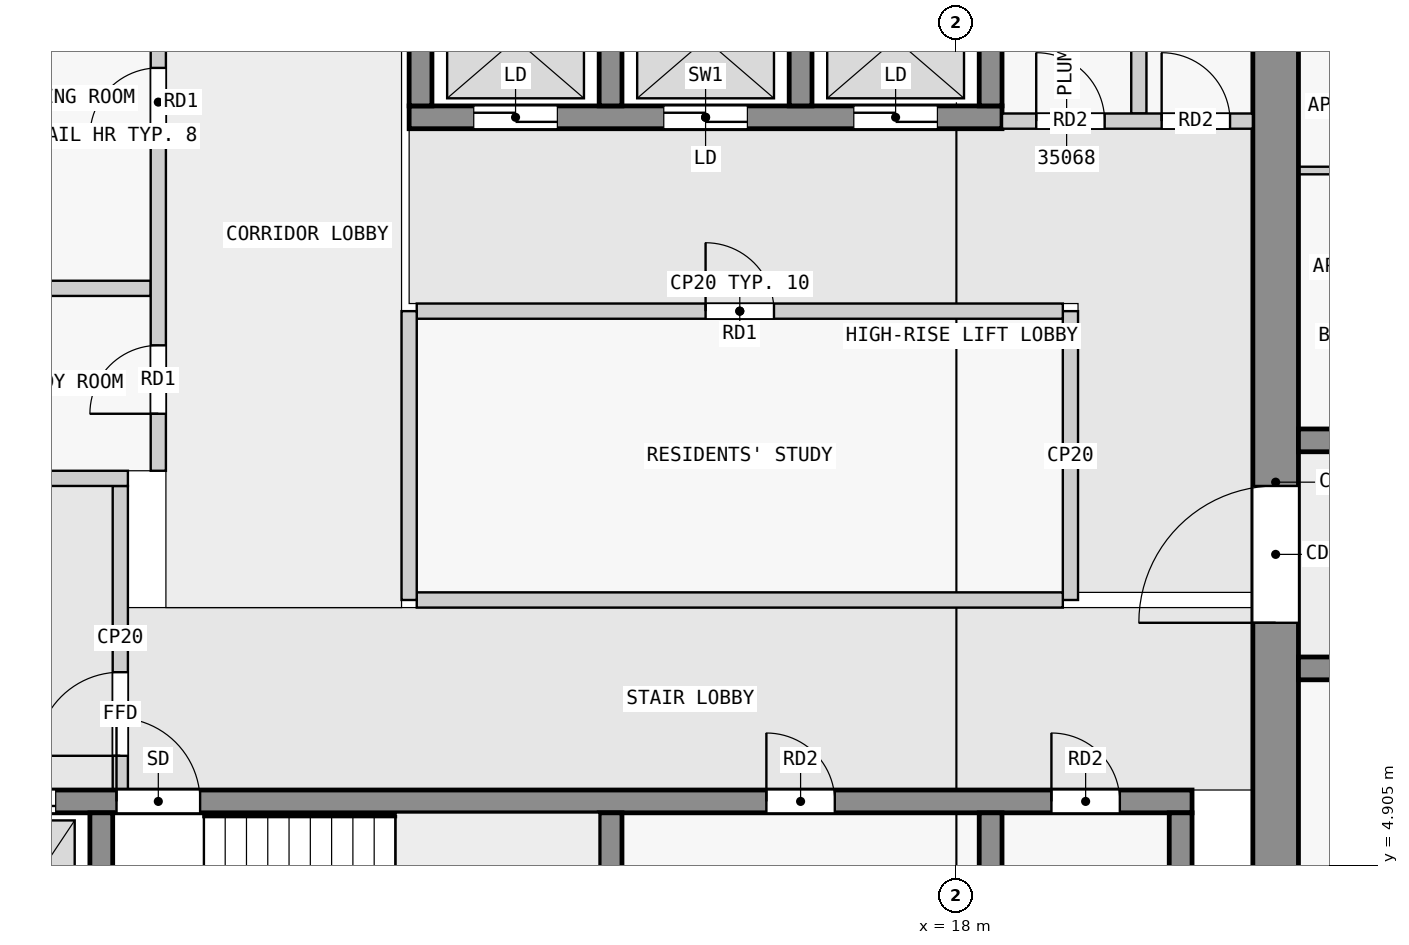
"""IFC4 building model, lengths in metres.
Left out: names, types, materials, properties, quantities, classifications, styles, units other than length and angle.
Written with IfcOpenShell. Run it as: python <this file> out.ifc"""

import sys

from ifc_helpers import new_model, si_unit, direction, frame, frame_2d, origin, place, context, subcontext, project, spatial, rectangle, extrude, element, fill, save


model = new_model("IFC4")
c1 = context("Model", 3, precision=1e-05, world=origin(), true_north=direction((0.0, 1.0)))
c2 = subcontext(c1, "Body", "Model", "MODEL_VIEW")
j1 = project(units=[si_unit("LENGTHUNIT", "METRE"), si_unit("PLANEANGLEUNIT", "RADIAN")], contexts=[c1])
p1 = place(None, origin())
s1 = spatial("IfcSite", under=j1, at=p1, CompositionType="ELEMENT")
p2 = place(p1, origin())
s2 = spatial("IfcBuilding", under=s1, at=p2, CompositionType="ELEMENT")
p3 = place(p2, frame((0.0, 0.0, 139.4)))
s3 = spatial("IfcBuildingStorey", under=s2, at=p3, CompositionType="ELEMENT", Elevation=139.4)
p4 = place(p3, frame((22.2, 2.5, 0.0), z_axis=(0.0, 0.0, 1.0), x_axis=(0.0, 1.0, 0.0)))
e1 = element("IfcWall", 1, at=p4, inside=s3, PredefinedType="SHEAR", context=c2, shape_type="SweptSolid", body=[
    extrude(rectangle(XDim=14.9, YDim=0.6, at=frame_2d((7.45, 0.0))), origin(), (0.0, 0.0, 1.0), 3.25),
])
p5 = place(p4, frame((5.6, 0.0, 0.0)))
e2 = element("IfcOpeningElement", 2, at=p5, cuts=e1, PredefinedType="OPENING", context=c2, shape_type="SweptSolid", body=[
    extrude(rectangle(XDim=1.8, YDim=2.1, at=frame_2d((0.9, 1.05))), frame((0.0, 0.31, 0.0), z_axis=(0.0, -1.0, 0.0), x_axis=(1.0, 0.0, 0.0)), (0.0, 0.0, 1.0), 0.62),
])
for number, where, z_axis, x_axis in (
    (3, (6.75, 2.8, 0.0), (0.0, 0.0, 1.0), (0.0, 1.0, 0.0)),
    (4, (13.45, 2.8, 0.0), (0.0, 0.0, 1.0), (0.0, 1.0, 0.0)),
    (5, (18.45, 2.8, 0.0), (0.0, 0.0, 1.0), (0.0, 1.0, 0.0)),
    (6, (20.95, 2.8, 0.0), (0.0, 0.0, 1.0), (0.0, 1.0, 0.0)),
):
    element("IfcWall", number, at=place(p3, frame(where, z_axis=z_axis, x_axis=x_axis)), inside=s3, PredefinedType="SHEAR", context=c2, shape_type="SweptSolid", body=[
        extrude(rectangle(XDim=2.8, YDim=0.3, at=frame_2d((1.4, 0.0))), origin(), (0.0, 0.0, 1.0), 3.25),
    ])
p6 = place(p3, frame((2.3, 5.75, 0.0), z_axis=(0.0, 0.0, 1.0), x_axis=(1.0, 0.0, 0.0)))
e7 = element("IfcWall", 7, at=p6, inside=s3, PredefinedType="SHEAR", context=c2, shape_type="SweptSolid", body=[
    extrude(rectangle(XDim=18.8, YDim=0.3, at=frame_2d((9.4, 0.0))), origin(), (0.0, 0.0, 1.0), 3.25),
])
p7 = place(p6, frame((4.65, 0.0, 0.0)))
e8 = element("IfcOpeningElement", 8, at=p7, cuts=e7, PredefinedType="OPENING", context=c2, shape_type="SweptSolid", body=[
    extrude(rectangle(XDim=1.1, YDim=2.1, at=frame_2d((0.55, 1.05))), frame((0.0, 0.16, 0.0), z_axis=(0.0, -1.0, 0.0), x_axis=(1.0, 0.0, 0.0)), (0.0, 0.0, 1.0), 0.32),
])
p8 = place(p6, frame((0.45, 0.0, 0.0)))
e9 = element("IfcOpeningElement", 9, at=p8, cuts=e7, PredefinedType="OPENING", context=c2, shape_type="SweptSolid", body=[
    extrude(rectangle(XDim=1.1, YDim=2.1, at=frame_2d((0.55, 1.05))), frame((0.0, 0.16, 0.0), z_axis=(0.0, -1.0, 0.0), x_axis=(1.0, 0.0, 0.0)), (0.0, 0.0, 1.0), 0.32),
])
p9 = place(p6, frame((2.75, 0.0, 0.0)))
e10 = element("IfcOpeningElement", 10, at=p9, cuts=e7, PredefinedType="OPENING", context=c2, shape_type="SweptSolid", body=[
    extrude(rectangle(XDim=1.1, YDim=2.1, at=frame_2d((0.55, 1.05))), frame((0.0, 0.16, 0.0), z_axis=(0.0, -1.0, 0.0), x_axis=(1.0, 0.0, 0.0)), (0.0, 0.0, 1.0), 0.32),
])
p10 = place(p6, frame((13.2, 0.0, 0.0)))
e11 = element("IfcOpeningElement", 11, at=p10, cuts=e7, PredefinedType="OPENING", context=c2, shape_type="SweptSolid", body=[
    extrude(rectangle(XDim=0.9, YDim=2.1, at=frame_2d((0.45, 1.05))), frame((0.0, 0.16, 0.0), z_axis=(0.0, -1.0, 0.0), x_axis=(1.0, 0.0, 0.0)), (0.0, 0.0, 1.0), 0.32),
])
p11 = place(p6, frame((16.95, 0.0, 0.0)))
e12 = element("IfcOpeningElement", 12, at=p11, cuts=e7, PredefinedType="OPENING", context=c2, shape_type="SweptSolid", body=[
    extrude(rectangle(XDim=0.9, YDim=2.1, at=frame_2d((0.45, 1.05))), frame((0.0, 0.16, 0.0), z_axis=(0.0, -1.0, 0.0), x_axis=(1.0, 0.0, 0.0)), (0.0, 0.0, 1.0), 0.32),
])
p12 = place(p3, frame((10.8, 14.75, 0.0), z_axis=(0.0, 0.0, 1.0), x_axis=(1.0, 0.0, 0.0)))
e13 = element("IfcWall", 13, at=p12, inside=s3, PredefinedType="SHEAR", context=c2, shape_type="SweptSolid", body=[
    extrude(rectangle(XDim=7.8, YDim=0.3, at=frame_2d((3.9, 0.0))), origin(), (0.0, 0.0, 1.0), 3.25),
])
p13 = place(p12, frame((0.85, 0.0, 0.0)))
e14 = element("IfcOpeningElement", 14, at=p13, cuts=e13, PredefinedType="OPENING", context=c2, shape_type="SweptSolid", body=[
    extrude(rectangle(XDim=1.1, YDim=2.1, at=frame_2d((0.55, 1.05))), frame((0.0, 0.16, 0.0), z_axis=(0.0, -1.0, 0.0), x_axis=(1.0, 0.0, 0.0)), (0.0, 0.0, 1.0), 0.32),
])
p14 = place(p12, frame((3.35, 0.0, 0.0)))
e15 = element("IfcOpeningElement", 15, at=p14, cuts=e13, PredefinedType="OPENING", context=c2, shape_type="SweptSolid", body=[
    extrude(rectangle(XDim=1.1, YDim=2.1, at=frame_2d((0.55, 1.05))), frame((0.0, 0.16, 0.0), z_axis=(0.0, -1.0, 0.0), x_axis=(1.0, 0.0, 0.0)), (0.0, 0.0, 1.0), 0.32),
])
p15 = place(p12, frame((5.85, 0.0, 0.0)))
e16 = element("IfcOpeningElement", 16, at=p15, cuts=e13, PredefinedType="OPENING", context=c2, shape_type="SweptSolid", body=[
    extrude(rectangle(XDim=1.1, YDim=2.1, at=frame_2d((0.55, 1.05))), frame((0.0, 0.16, 0.0), z_axis=(0.0, -1.0, 0.0), x_axis=(1.0, 0.0, 0.0)), (0.0, 0.0, 1.0), 0.32),
])
for number, where, z_axis, x_axis in (
    (17, (10.95, 14.9, 0.0), (0.0, 0.0, 1.0), (0.0, 1.0, 0.0)),
    (18, (13.45, 14.9, 0.0), (0.0, 0.0, 1.0), (0.0, 1.0, 0.0)),
    (19, (15.95, 14.9, 0.0), (0.0, 0.0, 1.0), (0.0, 1.0, 0.0)),
    (20, (18.45, 14.9, 0.0), (0.0, 0.0, 1.0), (0.0, 1.0, 0.0)),
):
    element("IfcWall", number, at=place(p3, frame(where, z_axis=z_axis, x_axis=x_axis)), inside=s3, PredefinedType="SHEAR", context=c2, shape_type="SweptSolid", body=[
        extrude(rectangle(XDim=2.0, YDim=0.3, at=frame_2d((1.0, 0.0))), origin(), (0.0, 0.0, 1.0), 3.25),
    ])
p16 = place(p3, frame((22.5, 7.5, 0.0), z_axis=(0.0, 0.0, 1.0), x_axis=(1.0, 0.0, 0.0)))
e21 = element("IfcWall", 21, at=p16, inside=s3, PredefinedType="SHEAR", context=c2, shape_type="SweptSolid", body=[
    extrude(rectangle(XDim=22.5, YDim=0.3, at=frame_2d((11.25, 0.0))), origin(), (0.0, 0.0, 1.0), 3.25),
])
p17 = place(p16, frame((1.75, 0.0, 0.0)))
e22 = element("IfcOpeningElement", 22, at=p17, cuts=e21, PredefinedType="OPENING", context=c2, shape_type="SweptSolid", body=[
    extrude(rectangle(XDim=1.0, YDim=2.1, at=frame_2d((0.5, 1.05))), frame((0.0, 0.16, 0.0), z_axis=(0.0, -1.0, 0.0), x_axis=(1.0, 0.0, 0.0)), (0.0, 0.0, 1.0), 0.32),
])
p18 = place(p16, frame((6.25, 0.0, 0.0)))
e23 = element("IfcOpeningElement", 23, at=p18, cuts=e21, PredefinedType="OPENING", context=c2, shape_type="SweptSolid", body=[
    extrude(rectangle(XDim=1.0, YDim=2.1, at=frame_2d((0.5, 1.05))), frame((0.0, 0.16, 0.0), z_axis=(0.0, -1.0, 0.0), x_axis=(1.0, 0.0, 0.0)), (0.0, 0.0, 1.0), 0.32),
])
p19 = place(p16, frame((10.35, 0.0, 0.0)))
e24 = element("IfcOpeningElement", 24, at=p19, cuts=e21, PredefinedType="OPENING", context=c2, shape_type="SweptSolid", body=[
    extrude(rectangle(XDim=1.8, YDim=2.1, at=frame_2d((0.9, 1.05))), frame((0.0, 0.16, 0.0), z_axis=(0.0, -1.0, 0.0), x_axis=(1.0, 0.0, 0.0)), (0.0, 0.0, 1.0), 0.32),
])
p20 = place(p16, frame((16.85, 0.0, 0.0)))
e25 = element("IfcOpeningElement", 25, at=p20, cuts=e21, PredefinedType="OPENING", context=c2, shape_type="SweptSolid", body=[
    extrude(rectangle(XDim=1.0, YDim=2.1, at=frame_2d((0.5, 1.05))), frame((0.0, 0.16, 0.0), z_axis=(0.0, -1.0, 0.0), x_axis=(1.0, 0.0, 0.0)), (0.0, 0.0, 1.0), 0.32),
])
p21 = place(p3, frame((22.5, 10.5, 0.0), z_axis=(0.0, 0.0, 1.0), x_axis=(1.0, 0.0, 0.0)))
e26 = element("IfcWall", 26, at=p21, inside=s3, PredefinedType="SHEAR", context=c2, shape_type="SweptSolid", body=[
    extrude(rectangle(XDim=22.5, YDim=0.3, at=frame_2d((11.25, 0.0))), origin(), (0.0, 0.0, 1.0), 3.25),
])
p22 = place(p21, frame((4.05, 0.0, 0.0)))
e27 = element("IfcOpeningElement", 27, at=p22, cuts=e26, PredefinedType="OPENING", context=c2, shape_type="SweptSolid", body=[
    extrude(rectangle(XDim=1.0, YDim=2.1, at=frame_2d((0.5, 1.05))), frame((0.0, 0.16, 0.0), z_axis=(0.0, -1.0, 0.0), x_axis=(1.0, 0.0, 0.0)), (0.0, 0.0, 1.0), 0.32),
])
p23 = place(p21, frame((10.85, 0.0, 0.0)))
e28 = element("IfcOpeningElement", 28, at=p23, cuts=e26, PredefinedType="OPENING", context=c2, shape_type="SweptSolid", body=[
    extrude(rectangle(XDim=0.9, YDim=2.1, at=frame_2d((0.45, 1.05))), frame((0.0, 0.16, 0.0), z_axis=(0.0, -1.0, 0.0), x_axis=(1.0, 0.0, 0.0)), (0.0, 0.0, 1.0), 0.32),
])
p24 = place(p21, frame((15.25, 0.0, 0.0)))
e29 = element("IfcOpeningElement", 29, at=p24, cuts=e26, PredefinedType="OPENING", context=c2, shape_type="SweptSolid", body=[
    extrude(rectangle(XDim=1.0, YDim=2.1, at=frame_2d((0.5, 1.05))), frame((0.0, 0.16, 0.0), z_axis=(0.0, -1.0, 0.0), x_axis=(1.0, 0.0, 0.0)), (0.0, 0.0, 1.0), 0.32),
])
p25 = place(p21, frame((18.75, 0.0, 0.0)))
e30 = element("IfcOpeningElement", 30, at=p25, cuts=e26, PredefinedType="OPENING", context=c2, shape_type="SweptSolid", body=[
    extrude(rectangle(XDim=0.9, YDim=2.1, at=frame_2d((0.45, 1.05))), frame((0.0, 0.16, 0.0), z_axis=(0.0, -1.0, 0.0), x_axis=(1.0, 0.0, 0.0)), (0.0, 0.0, 1.0), 0.32),
])
p26 = place(p21, frame((20.95, 0.0, 0.0)))
e31 = element("IfcOpeningElement", 31, at=p26, cuts=e26, PredefinedType="OPENING", context=c2, shape_type="SweptSolid", body=[
    extrude(rectangle(XDim=1.0, YDim=2.1, at=frame_2d((0.5, 1.05))), frame((0.0, 0.16, 0.0), z_axis=(0.0, -1.0, 0.0), x_axis=(1.0, 0.0, 0.0)), (0.0, 0.0, 1.0), 0.32),
])
p27 = place(p3, frame((7.0, 5.9, 0.0), z_axis=(0.0, 0.0, 1.0), x_axis=(0.0, 1.0, 0.0)))
e32 = element("IfcWall", 32, at=p27, inside=s3, PredefinedType="PARTITIONING", context=c2, shape_type="SweptSolid", body=[
    extrude(rectangle(XDim=4.0, YDim=0.2, at=frame_2d((2.0, 0.0))), origin(), (0.0, 0.0, 1.0), 3.25),
])
p28 = place(p27, frame((0.45, 0.0, 0.0)))
e33 = element("IfcOpeningElement", 33, at=p28, cuts=e32, PredefinedType="OPENING", context=c2, shape_type="SweptSolid", body=[
    extrude(rectangle(XDim=1.1, YDim=2.1, at=frame_2d((0.55, 1.05))), frame((0.0, 0.11, 0.0), z_axis=(0.0, -1.0, 0.0), x_axis=(1.0, 0.0, 0.0)), (0.0, 0.0, 1.0), 0.22),
])
p29 = place(p3, frame((5.15, 10.0, 0.0), z_axis=(0.0, 0.0, 1.0), x_axis=(1.0, 0.0, 0.0)))
e34 = element("IfcWall", 34, at=p29, inside=s3, PredefinedType="PARTITIONING", context=c2, shape_type="SweptSolid", body=[
    extrude(rectangle(XDim=1.95, YDim=0.2, at=frame_2d((0.975, 0.0))), origin(), (0.0, 0.0, 1.0), 3.25),
])
p30 = place(p3, frame((10.8, 8.4, 0.0), z_axis=(0.0, 0.0, 1.0), x_axis=(0.0, 1.0, 0.0)))
e35 = element("IfcWall", 35, at=p30, inside=s3, PredefinedType="PARTITIONING", context=c2, shape_type="SweptSolid", body=[
    extrude(rectangle(XDim=3.8, YDim=0.2, at=frame_2d((1.9, 0.0))), origin(), (0.0, 0.0, 1.0), 3.25),
])
p31 = place(p3, frame((10.9, 8.4, 0.0), z_axis=(0.0, 0.0, 1.0), x_axis=(1.0, 0.0, 0.0)))
e36 = element("IfcWall", 36, at=p31, inside=s3, PredefinedType="PARTITIONING", context=c2, shape_type="SweptSolid", body=[
    extrude(rectangle(XDim=8.5, YDim=0.2, at=frame_2d((4.25, 0.0))), origin(), (0.0, 0.0, 1.0), 3.25),
])
p32 = place(p3, frame((19.5, 8.4, 0.0), z_axis=(0.0, 0.0, 1.0), x_axis=(0.0, 1.0, 0.0)))
e37 = element("IfcWall", 37, at=p32, inside=s3, PredefinedType="PARTITIONING", context=c2, shape_type="SweptSolid", body=[
    extrude(rectangle(XDim=3.8, YDim=0.2, at=frame_2d((1.9, 0.0))), origin(), (0.0, 0.0, 1.0), 3.25),
])
p33 = place(p3, frame((10.9, 12.2, 0.0), z_axis=(0.0, 0.0, 1.0), x_axis=(1.0, 0.0, 0.0)))
e38 = element("IfcWall", 38, at=p33, inside=s3, PredefinedType="PARTITIONING", context=c2, shape_type="SweptSolid", body=[
    extrude(rectangle(XDim=8.5, YDim=0.2, at=frame_2d((4.25, 0.0))), origin(), (0.0, 0.0, 1.0), 3.25),
])
p34 = place(p33, frame((3.8, 0.0, 0.0)))
e39 = element("IfcOpeningElement", 39, at=p34, cuts=e38, PredefinedType="OPENING", context=c2, shape_type="SweptSolid", body=[
    extrude(rectangle(XDim=0.9, YDim=2.1, at=frame_2d((0.45, 1.05))), frame((0.0, 0.11, 0.0), z_axis=(0.0, -1.0, 0.0), x_axis=(1.0, 0.0, 0.0)), (0.0, 0.0, 1.0), 0.22),
])
p35 = place(p3, frame((7.5, 10.1, 0.0), z_axis=(0.0, 0.0, 1.0), x_axis=(0.0, 1.0, 0.0)))
e40 = element("IfcWall", 40, at=p35, inside=s3, PredefinedType="PARTITIONING", context=c2, shape_type="SweptSolid", body=[
    extrude(rectangle(XDim=7.3, YDim=0.2, at=frame_2d((3.65, 0.0))), origin(), (0.0, 0.0, 1.0), 3.25),
])
p36 = place(p35, frame((0.75, 0.0, 0.0)))
e41 = element("IfcOpeningElement", 41, at=p36, cuts=e40, PredefinedType="OPENING", context=c2, shape_type="SweptSolid", body=[
    extrude(rectangle(XDim=0.9, YDim=2.1, at=frame_2d((0.45, 1.05))), frame((0.0, 0.11, 0.0), z_axis=(0.0, -1.0, 0.0), x_axis=(1.0, 0.0, 0.0)), (0.0, 0.0, 1.0), 0.22),
])
p37 = place(p35, frame((4.4, 0.0, 0.0)))
e42 = element("IfcOpeningElement", 42, at=p37, cuts=e40, PredefinedType="OPENING", context=c2, shape_type="SweptSolid", body=[
    extrude(rectangle(XDim=0.9, YDim=2.1, at=frame_2d((0.45, 1.05))), frame((0.0, 0.11, 0.0), z_axis=(0.0, -1.0, 0.0), x_axis=(1.0, 0.0, 0.0)), (0.0, 0.0, 1.0), 0.22),
])
p38 = place(p3, frame((5.15, 12.5, 0.0), z_axis=(0.0, 0.0, 1.0), x_axis=(1.0, 0.0, 0.0)))
e43 = element("IfcWall", 43, at=p38, inside=s3, PredefinedType="PARTITIONING", context=c2, shape_type="SweptSolid", body=[
    extrude(rectangle(XDim=2.25, YDim=0.2, at=frame_2d((1.125, 0.0))), origin(), (0.0, 0.0, 1.0), 3.25),
])
p39 = place(p3, frame((18.6, 14.7, 0.0), z_axis=(0.0, 0.0, 1.0), x_axis=(1.0, 0.0, 0.0)))
e44 = element("IfcWall", 44, at=p39, inside=s3, PredefinedType="PARTITIONING", context=c2, shape_type="SweptSolid", body=[
    extrude(rectangle(XDim=3.3, YDim=0.2, at=frame_2d((1.65, 0.0))), origin(), (0.0, 0.0, 1.0), 3.25),
])
p40 = place(p39, frame((0.45, 0.0, 0.0)))
e45 = element("IfcOpeningElement", 45, at=p40, cuts=e44, PredefinedType="OPENING", context=c2, shape_type="SweptSolid", body=[
    extrude(rectangle(XDim=0.9, YDim=2.1, at=frame_2d((0.45, 1.05))), frame((0.0, 0.11, 0.0), z_axis=(0.0, -1.0, 0.0), x_axis=(1.0, 0.0, 0.0)), (0.0, 0.0, 1.0), 0.22),
])
p41 = place(p39, frame((2.1, 0.0, 0.0)))
e46 = element("IfcOpeningElement", 46, at=p41, cuts=e44, PredefinedType="OPENING", context=c2, shape_type="SweptSolid", body=[
    extrude(rectangle(XDim=0.9, YDim=2.1, at=frame_2d((0.45, 1.05))), frame((0.0, 0.11, 0.0), z_axis=(0.0, -1.0, 0.0), x_axis=(1.0, 0.0, 0.0)), (0.0, 0.0, 1.0), 0.22),
])
p42 = place(p3, frame((20.4, 14.8, 0.0), z_axis=(0.0, 0.0, 1.0), x_axis=(0.0, 1.0, 0.0)))
e47 = element("IfcWall", 47, at=p42, inside=s3, PredefinedType="PARTITIONING", context=c2, shape_type="SweptSolid", body=[
    extrude(rectangle(XDim=2.6, YDim=0.2, at=frame_2d((1.3, 0.0))), origin(), (0.0, 0.0, 1.0), 3.25),
])
p43 = place(p3, frame((24.25, 14.05, 0.0), z_axis=(0.0, 0.0, 1.0), x_axis=(-1.0, 0.0, 0.0)))
e48 = element("IfcWall", 48, at=p43, inside=s3, PredefinedType="PARTITIONING", context=c2, shape_type="SweptSolid", body=[
    extrude(rectangle(XDim=1.75, YDim=0.1, at=frame_2d((0.875, 0.0))), origin(), (0.0, 0.0, 1.0), 3.25),
])
p44 = place(p28, origin())
e49 = element("IfcDoor", 49, at=p44, inside=s3, OperationType="SINGLE_SWING_LEFT", PredefinedType="DOOR", context=c2, shape_type="SweptSolid", body=[
    extrude(rectangle(XDim=1.1, YDim=2.1, at=frame_2d((0.55, 1.05))), frame((0.0, 0.025, 0.0), z_axis=(0.0, -1.0, 0.0), x_axis=(1.0, 0.0, 0.0)), (0.0, 0.0, 1.0), 0.05),
])
fill(e33, e49)
p45 = place(p34, origin())
e50 = element("IfcDoor", 50, at=p45, inside=s3, OperationType="SINGLE_SWING_LEFT", PredefinedType="DOOR", context=c2, shape_type="SweptSolid", body=[
    extrude(rectangle(XDim=0.9, YDim=2.1, at=frame_2d((0.45, 1.05))), frame((0.0, 0.025, 0.0), z_axis=(0.0, -1.0, 0.0), x_axis=(1.0, 0.0, 0.0)), (0.0, 0.0, 1.0), 0.05),
])
fill(e39, e50)
p46 = place(p7, origin())
e51 = element("IfcDoor", 51, at=p46, inside=s3, OperationType="SINGLE_SWING_LEFT", PredefinedType="DOOR", context=c2, shape_type="SweptSolid", body=[
    extrude(rectangle(XDim=1.1, YDim=2.1, at=frame_2d((0.55, 1.05))), frame((0.0, 0.025, 0.0), z_axis=(0.0, -1.0, 0.0), x_axis=(1.0, 0.0, 0.0)), (0.0, 0.0, 1.0), 0.05),
])
fill(e8, e51)
p47 = place(p9, origin())
e52 = element("IfcDoor", 52, at=p47, inside=s3, OperationType="DOUBLE_DOOR_SLIDING", PredefinedType="DOOR", context=c2, shape_type="SweptSolid", body=[
    extrude(rectangle(XDim=1.1, YDim=2.1, at=frame_2d((0.55, 1.05))), frame((0.0, 0.025, 0.0), z_axis=(0.0, -1.0, 0.0), x_axis=(1.0, 0.0, 0.0)), (0.0, 0.0, 1.0), 0.05),
])
fill(e10, e52)
p48 = place(p13, origin())
e53 = element("IfcDoor", 53, at=p48, inside=s3, OperationType="DOUBLE_DOOR_SLIDING", PredefinedType="DOOR", context=c2, shape_type="SweptSolid", body=[
    extrude(rectangle(XDim=1.1, YDim=2.1, at=frame_2d((0.55, 1.05))), frame((0.0, 0.025, 0.0), z_axis=(0.0, -1.0, 0.0), x_axis=(1.0, 0.0, 0.0)), (0.0, 0.0, 1.0), 0.05),
])
fill(e14, e53)
p49 = place(p14, origin())
e54 = element("IfcDoor", 54, at=p49, inside=s3, OperationType="DOUBLE_DOOR_SLIDING", PredefinedType="DOOR", context=c2, shape_type="SweptSolid", body=[
    extrude(rectangle(XDim=1.1, YDim=2.1, at=frame_2d((0.55, 1.05))), frame((0.0, 0.025, 0.0), z_axis=(0.0, -1.0, 0.0), x_axis=(1.0, 0.0, 0.0)), (0.0, 0.0, 1.0), 0.05),
])
fill(e15, e54)
p50 = place(p15, origin())
e55 = element("IfcDoor", 55, at=p50, inside=s3, OperationType="DOUBLE_DOOR_SLIDING", PredefinedType="DOOR", context=c2, shape_type="SweptSolid", body=[
    extrude(rectangle(XDim=1.1, YDim=2.1, at=frame_2d((0.55, 1.05))), frame((0.0, 0.025, 0.0), z_axis=(0.0, -1.0, 0.0), x_axis=(1.0, 0.0, 0.0)), (0.0, 0.0, 1.0), 0.05),
])
fill(e16, e55)
p51 = place(p5, origin())
e56 = element("IfcDoor", 56, at=p51, inside=s3, OperationType="DOUBLE_DOOR_SINGLE_SWING", PredefinedType="DOOR", context=c2, shape_type="SweptSolid", body=[
    extrude(rectangle(XDim=1.8, YDim=2.1, at=frame_2d((0.9, 1.05))), frame((0.0, 0.025, 0.0), z_axis=(0.0, -1.0, 0.0), x_axis=(1.0, 0.0, 0.0)), (0.0, 0.0, 1.0), 0.05),
])
fill(e2, e56)
p52 = place(p36, origin())
e57 = element("IfcDoor", 57, at=p52, inside=s3, OperationType="SINGLE_SWING_RIGHT", PredefinedType="DOOR", context=c2, shape_type="SweptSolid", body=[
    extrude(rectangle(XDim=0.9, YDim=2.1, at=frame_2d((0.45, 1.05))), frame((0.0, 0.025, 0.0), z_axis=(0.0, -1.0, 0.0), x_axis=(1.0, 0.0, 0.0)), (0.0, 0.0, 1.0), 0.05),
])
fill(e41, e57)
p53 = place(p37, origin())
e58 = element("IfcDoor", 58, at=p53, inside=s3, OperationType="SINGLE_SWING_RIGHT", PredefinedType="DOOR", context=c2, shape_type="SweptSolid", body=[
    extrude(rectangle(XDim=0.9, YDim=2.1, at=frame_2d((0.45, 1.05))), frame((0.0, 0.025, 0.0), z_axis=(0.0, -1.0, 0.0), x_axis=(1.0, 0.0, 0.0)), (0.0, 0.0, 1.0), 0.05),
])
fill(e42, e58)
p54 = place(p40, origin())
e59 = element("IfcDoor", 59, at=p54, inside=s3, OperationType="SINGLE_SWING_LEFT", PredefinedType="DOOR", context=c2, shape_type="SweptSolid", body=[
    extrude(rectangle(XDim=0.9, YDim=2.1, at=frame_2d((0.45, 1.05))), frame((0.0, 0.025, 0.0), z_axis=(0.0, -1.0, 0.0), x_axis=(1.0, 0.0, 0.0)), (0.0, 0.0, 1.0), 0.05),
])
fill(e45, e59)
p55 = place(p41, origin())
e60 = element("IfcDoor", 60, at=p55, inside=s3, OperationType="SINGLE_SWING_LEFT", PredefinedType="DOOR", context=c2, shape_type="SweptSolid", body=[
    extrude(rectangle(XDim=0.9, YDim=2.1, at=frame_2d((0.45, 1.05))), frame((0.0, 0.025, 0.0), z_axis=(0.0, -1.0, 0.0), x_axis=(1.0, 0.0, 0.0)), (0.0, 0.0, 1.0), 0.05),
])
fill(e46, e60)
p56 = place(p10, origin())
e61 = element("IfcDoor", 61, at=p56, inside=s3, OperationType="SINGLE_SWING_LEFT", PredefinedType="DOOR", context=c2, shape_type="SweptSolid", body=[
    extrude(rectangle(XDim=0.9, YDim=2.1, at=frame_2d((0.45, 1.05))), frame((0.0, 0.025, 0.0), z_axis=(0.0, -1.0, 0.0), x_axis=(1.0, 0.0, 0.0)), (0.0, 0.0, 1.0), 0.05),
])
fill(e11, e61)
p57 = place(p11, origin())
e62 = element("IfcDoor", 62, at=p57, inside=s3, OperationType="SINGLE_SWING_LEFT", PredefinedType="DOOR", context=c2, shape_type="SweptSolid", body=[
    extrude(rectangle(XDim=0.9, YDim=2.1, at=frame_2d((0.45, 1.05))), frame((0.0, 0.025, 0.0), z_axis=(0.0, -1.0, 0.0), x_axis=(1.0, 0.0, 0.0)), (0.0, 0.0, 1.0), 0.05),
])
fill(e12, e62)
save(model, sys.argv[1])
